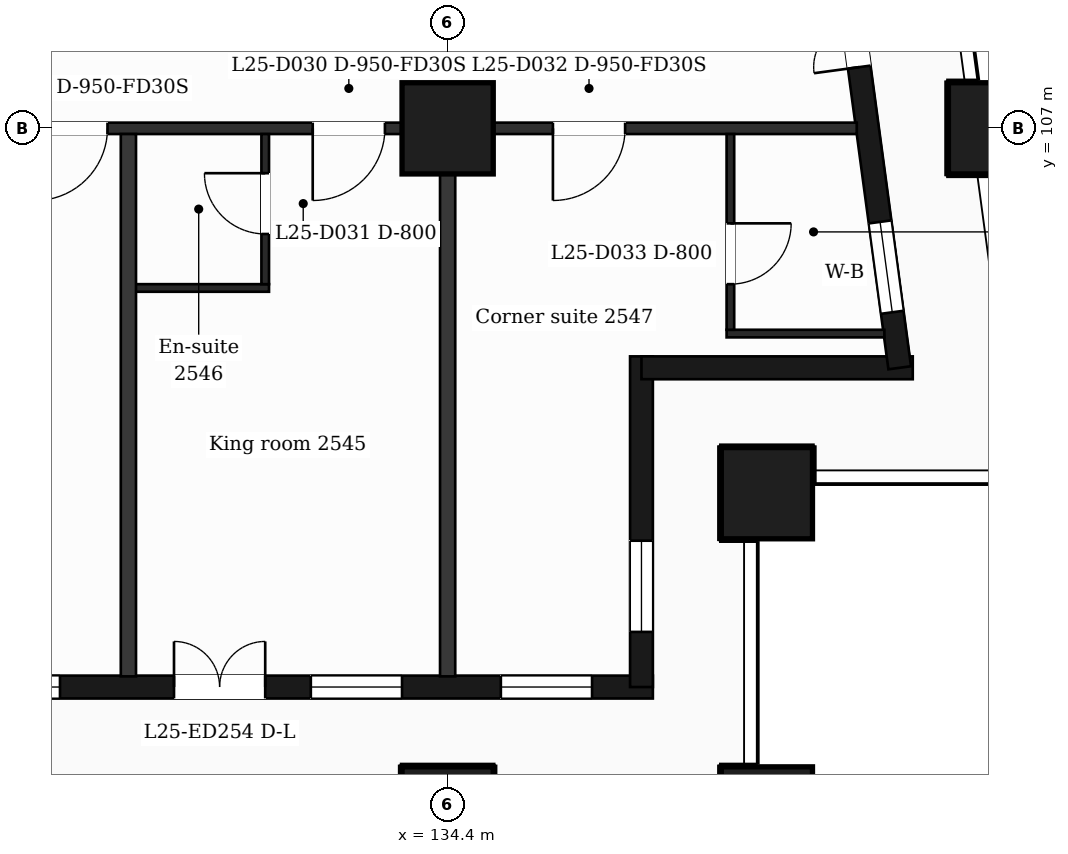
"""IFC4 building model, lengths in metres.
Left out: names, types, materials, properties, quantities, classifications, styles, units other than length and angle.
Written with IfcOpenShell. Run it as: python <this file> out.ifc"""

import sys

from ifc_helpers import new_model, si_unit, direction, frame, frame_2d, origin, origin_2d, place, context, subcontext, project, spatial, rectangle, extrude, element, fill, save


model = new_model("IFC4")
c1 = context("Model", 3, precision=1e-05, world=origin(), true_north=direction((0.0, 1.0)))
c2 = subcontext(c1, "Body", "Model", "MODEL_VIEW")
j1 = project(units=[si_unit("LENGTHUNIT", "METRE"), si_unit("PLANEANGLEUNIT", "RADIAN")], contexts=[c1])
p1 = place(None, origin())
s1 = spatial("IfcSite", under=j1, at=p1, CompositionType="ELEMENT")
p2 = place(p1, origin())
s2 = spatial("IfcBuilding", under=s1, at=p2, CompositionType="ELEMENT")
p3 = place(p2, frame((0.0, 0.0, 109.5)))
s3 = spatial("IfcBuildingStorey", under=s2, at=p3, CompositionType="ELEMENT", Elevation=109.5)
for number, where, z_axis, x_axis in (
    (1, (134.4, 98.0, 0.0), (0.0, 0.0, 1.0), (1.0, 0.0, 0.0)),
    (2, (138.6, 98.0, 0.0), (0.0, 0.0, 1.0), (1.0, 0.0, 0.0)),
    (3, (138.6, 102.2, 0.0), (0.0, 0.0, 1.0), (1.0, 0.0, 0.0)),
    (4, (134.4, 107.0, 0.0), (0.0, 0.0, 1.0), (1.0, 0.0, 0.0)),
    (5, (141.588, 107.0, 0.0), (0.0, 0.0, 1.0), (1.0, 0.0, 0.0)),
):
    element("IfcColumn", number, at=place(p3, frame(where, z_axis=z_axis, x_axis=x_axis)), inside=s3, PredefinedType="COLUMN", context=c2, shape_type="SweptSolid", body=[
        extrude(rectangle(XDim=1.2, YDim=1.2, at=origin_2d()), origin(), (0.0, 0.0, 1.0), 3.7),
    ])
p4 = place(p3, frame((89.85, 99.65, 0.0), z_axis=(0.0, 0.0, 1.0), x_axis=(1.0, 0.0, 0.0)))
e6 = element("IfcWall", 6, at=p4, inside=s3, PredefinedType="SOLIDWALL", context=c2, shape_type="SweptSolid", body=[
    extrude(rectangle(XDim=47.25, YDim=0.3, at=frame_2d((23.625, 0.0))), origin(), (0.0, 0.0, 1.0), 3.38),
])
p5 = place(p4, frame((0.725, 0.0, 0.9)))
e7 = element("IfcOpeningElement", 7, at=p5, cuts=e6, PredefinedType="OPENING", context=c2, shape_type="SweptSolid", body=[
    extrude(rectangle(XDim=1.2, YDim=2.1, at=frame_2d((0.6, 1.05))), frame((0.0, 0.16, 0.0), z_axis=(0.0, -1.0, 0.0), x_axis=(1.0, 0.0, 0.0)), (0.0, 0.0, 1.0), 0.32),
])
p6 = place(p4, frame((3.45, 0.0, 0.9)))
e8 = element("IfcOpeningElement", 8, at=p6, cuts=e6, PredefinedType="OPENING", context=c2, shape_type="SweptSolid", body=[
    extrude(rectangle(XDim=2.4, YDim=2.1, at=frame_2d((1.2, 1.05))), frame((0.0, 0.16, 0.0), z_axis=(0.0, -1.0, 0.0), x_axis=(1.0, 0.0, 0.0)), (0.0, 0.0, 1.0), 0.32),
])
p7 = place(p4, frame((7.65, 0.0, 0.9)))
e9 = element("IfcOpeningElement", 9, at=p7, cuts=e6, PredefinedType="OPENING", context=c2, shape_type="SweptSolid", body=[
    extrude(rectangle(XDim=2.4, YDim=2.1, at=frame_2d((1.2, 1.05))), frame((0.0, 0.16, 0.0), z_axis=(0.0, -1.0, 0.0), x_axis=(1.0, 0.0, 0.0)), (0.0, 0.0, 1.0), 0.32),
])
p8 = place(p4, frame((11.85, 0.0, 0.9)))
e10 = element("IfcOpeningElement", 10, at=p8, cuts=e6, PredefinedType="OPENING", context=c2, shape_type="SweptSolid", body=[
    extrude(rectangle(XDim=2.4, YDim=2.1, at=frame_2d((1.2, 1.05))), frame((0.0, 0.16, 0.0), z_axis=(0.0, -1.0, 0.0), x_axis=(1.0, 0.0, 0.0)), (0.0, 0.0, 1.0), 0.32),
])
p9 = place(p4, frame((16.05, 0.0, 0.9)))
e11 = element("IfcOpeningElement", 11, at=p9, cuts=e6, PredefinedType="OPENING", context=c2, shape_type="SweptSolid", body=[
    extrude(rectangle(XDim=2.4, YDim=2.1, at=frame_2d((1.2, 1.05))), frame((0.0, 0.16, 0.0), z_axis=(0.0, -1.0, 0.0), x_axis=(1.0, 0.0, 0.0)), (0.0, 0.0, 1.0), 0.32),
])
p10 = place(p4, frame((20.25, 0.0, 0.9)))
e12 = element("IfcOpeningElement", 12, at=p10, cuts=e6, PredefinedType="OPENING", context=c2, shape_type="SweptSolid", body=[
    extrude(rectangle(XDim=2.4, YDim=2.1, at=frame_2d((1.2, 1.05))), frame((0.0, 0.16, 0.0), z_axis=(0.0, -1.0, 0.0), x_axis=(1.0, 0.0, 0.0)), (0.0, 0.0, 1.0), 0.32),
])
p11 = place(p4, frame((25.05, 0.0, 0.9)))
e13 = element("IfcOpeningElement", 13, at=p11, cuts=e6, PredefinedType="OPENING", context=c2, shape_type="SweptSolid", body=[
    extrude(rectangle(XDim=1.2, YDim=2.1, at=frame_2d((0.6, 1.05))), frame((0.0, 0.16, 0.0), z_axis=(0.0, -1.0, 0.0), x_axis=(1.0, 0.0, 0.0)), (0.0, 0.0, 1.0), 0.32),
])
p12 = place(p4, frame((29.25, 0.0, 0.9)))
e14 = element("IfcOpeningElement", 14, at=p12, cuts=e6, PredefinedType="OPENING", context=c2, shape_type="SweptSolid", body=[
    extrude(rectangle(XDim=1.2, YDim=2.1, at=frame_2d((0.6, 1.05))), frame((0.0, 0.16, 0.0), z_axis=(0.0, -1.0, 0.0), x_axis=(1.0, 0.0, 0.0)), (0.0, 0.0, 1.0), 0.32),
])
p13 = place(p4, frame((32.55, 0.0, 0.0)))
e15 = element("IfcOpeningElement", 15, at=p13, cuts=e6, PredefinedType="OPENING", context=c2, shape_type="SweptSolid", body=[
    extrude(rectangle(XDim=1.2, YDim=2.4, at=frame_2d((0.6, 1.2))), frame((0.0, 0.16, 0.0), z_axis=(0.0, -1.0, 0.0), x_axis=(1.0, 0.0, 0.0)), (0.0, 0.0, 1.0), 0.32),
])
p14 = place(p4, frame((34.35, 0.0, 0.9)))
e16 = element("IfcOpeningElement", 16, at=p14, cuts=e6, PredefinedType="OPENING", context=c2, shape_type="SweptSolid", body=[
    extrude(rectangle(XDim=1.2, YDim=2.1, at=frame_2d((0.6, 1.05))), frame((0.0, 0.16, 0.0), z_axis=(0.0, -1.0, 0.0), x_axis=(1.0, 0.0, 0.0)), (0.0, 0.0, 1.0), 0.32),
])
p15 = place(p4, frame((37.05, 0.0, 0.9)))
e17 = element("IfcOpeningElement", 17, at=p15, cuts=e6, PredefinedType="OPENING", context=c2, shape_type="SweptSolid", body=[
    extrude(rectangle(XDim=2.4, YDim=2.1, at=frame_2d((1.2, 1.05))), frame((0.0, 0.16, 0.0), z_axis=(0.0, -1.0, 0.0), x_axis=(1.0, 0.0, 0.0)), (0.0, 0.0, 1.0), 0.32),
])
p16 = place(p4, frame((40.95, 0.0, 0.0)))
e18 = element("IfcOpeningElement", 18, at=p16, cuts=e6, PredefinedType="OPENING", context=c2, shape_type="SweptSolid", body=[
    extrude(rectangle(XDim=1.2, YDim=2.4, at=frame_2d((0.6, 1.2))), frame((0.0, 0.16, 0.0), z_axis=(0.0, -1.0, 0.0), x_axis=(1.0, 0.0, 0.0)), (0.0, 0.0, 1.0), 0.32),
])
p17 = place(p4, frame((42.75, 0.0, 0.9)))
e19 = element("IfcOpeningElement", 19, at=p17, cuts=e6, PredefinedType="OPENING", context=c2, shape_type="SweptSolid", body=[
    extrude(rectangle(XDim=1.2, YDim=2.1, at=frame_2d((0.6, 1.05))), frame((0.0, 0.16, 0.0), z_axis=(0.0, -1.0, 0.0), x_axis=(1.0, 0.0, 0.0)), (0.0, 0.0, 1.0), 0.32),
])
p18 = place(p4, frame((45.25, 0.0, 0.9)))
e20 = element("IfcOpeningElement", 20, at=p18, cuts=e6, PredefinedType="OPENING", context=c2, shape_type="SweptSolid", body=[
    extrude(rectangle(XDim=1.2, YDim=2.1, at=frame_2d((0.6, 1.05))), frame((0.0, 0.16, 0.0), z_axis=(0.0, -1.0, 0.0), x_axis=(1.0, 0.0, 0.0)), (0.0, 0.0, 1.0), 0.32),
])
p19 = place(p3, frame((136.95, 99.65, 0.0), z_axis=(0.0, 0.0, 1.0), x_axis=(0.0, 1.0, 0.0)))
e21 = element("IfcWall", 21, at=p19, inside=s3, PredefinedType="SOLIDWALL", context=c2, shape_type="SweptSolid", body=[
    extrude(rectangle(XDim=4.35, YDim=0.3, at=frame_2d((2.175, 0.0))), origin(), (0.0, 0.0, 1.0), 3.38),
])
p20 = place(p19, frame((0.725, 0.0, 0.9)))
e22 = element("IfcOpeningElement", 22, at=p20, cuts=e21, PredefinedType="OPENING", context=c2, shape_type="SweptSolid", body=[
    extrude(rectangle(XDim=1.2, YDim=2.1, at=frame_2d((0.6, 1.05))), frame((0.0, 0.16, 0.0), z_axis=(0.0, -1.0, 0.0), x_axis=(1.0, 0.0, 0.0)), (0.0, 0.0, 1.0), 0.32),
])
p21 = place(p3, frame((136.95, 103.85, 0.0), z_axis=(0.0, 0.0, 1.0), x_axis=(1.0, 0.0, 0.0)))
e23 = element("IfcWall", 23, at=p21, inside=s3, PredefinedType="SOLIDWALL", context=c2, shape_type="SweptSolid", body=[
    extrude(rectangle(XDim=3.569, YDim=0.3, at=frame_2d((1.785, 0.0))), origin(), (0.0, 0.0, 1.0), 3.38),
])
p22 = place(p3, frame((140.348, 103.85, 0.0), z_axis=(0.0, 0.0, 1.0), x_axis=(-0.133431549479, 0.991058031401, 0.0)))
e24 = element("IfcWall", 24, at=p22, inside=s3, PredefinedType="SOLIDWALL", context=c2, shape_type="SweptSolid", body=[
    extrude(rectangle(XDim=6.609, YDim=0.3, at=frame_2d((3.304, 0.0))), origin(), (0.0, 0.0, 1.0), 3.38),
])
p23 = place(p22, frame((0.737, 0.0, 0.9)))
e25 = element("IfcOpeningElement", 25, at=p23, cuts=e24, PredefinedType="OPENING", context=c2, shape_type="SweptSolid", body=[
    extrude(rectangle(XDim=1.2, YDim=2.1, at=frame_2d((0.6, 1.05))), frame((0.0, 0.16, 0.0), z_axis=(0.0, -1.0, 0.0), x_axis=(1.0, 0.0, 0.0)), (0.0, 0.0, 1.0), 0.32),
])
p24 = place(p22, frame((3.991, 0.0, 0.0)))
e26 = element("IfcOpeningElement", 26, at=p24, cuts=e24, PredefinedType="OPENING", context=c2, shape_type="SweptSolid", body=[
    extrude(rectangle(XDim=1.2, YDim=2.4, at=frame_2d((0.6, 1.2))), frame((0.0, 0.16, 0.0), z_axis=(0.0, -1.0, 0.0), x_axis=(1.0, 0.0, 0.0)), (0.0, 0.0, 1.0), 0.32),
])
p25 = place(p3, frame((138.07, 104.3, 0.0), z_axis=(0.0, 0.0, 1.0), x_axis=(1.0, 0.0, 0.0)))
e27 = element("IfcWall", 27, at=p25, inside=s3, PredefinedType="PARTITIONING", context=c2, shape_type="SweptSolid", body=[
    extrude(rectangle(XDim=2.076, YDim=0.1, at=frame_2d((1.038, 0.0))), origin(), (0.0, 0.0, 1.0), 3.38),
])
p26 = place(p3, frame((130.2, 104.9, 0.0), z_axis=(0.0, 0.0, 1.0), x_axis=(1.0, 0.0, 0.0)))
e28 = element("IfcWall", 28, at=p26, inside=s3, PredefinedType="PARTITIONING", context=c2, shape_type="SweptSolid", body=[
    extrude(rectangle(XDim=1.85, YDim=0.1, at=frame_2d((0.925, 0.0))), origin(), (0.0, 0.0, 1.0), 3.38),
])
p27 = place(p3, frame((87.018, 107.0, 0.0), z_axis=(0.0, 0.0, 1.0), x_axis=(1.0, 0.0, 0.0)))
e29 = element("IfcWall", 29, at=p27, inside=s3, PredefinedType="PARTITIONING", context=c2, shape_type="SweptSolid", body=[
    extrude(rectangle(XDim=52.765, YDim=0.15, at=frame_2d((26.382, 0.0))), origin(), (0.0, 0.0, 1.0), 3.38),
])
p28 = place(p27, frame((1.032, 0.0, 0.0)))
e30 = element("IfcOpeningElement", 30, at=p28, cuts=e29, PredefinedType="OPENING", context=c2, shape_type="SweptSolid", body=[
    extrude(rectangle(XDim=0.95, YDim=2.1, at=frame_2d((0.475, 1.05))), frame((0.0, 0.085, 0.0), z_axis=(0.0, -1.0, 0.0), x_axis=(1.0, 0.0, 0.0)), (0.0, 0.0, 1.0), 0.17),
])
p29 = place(p27, frame((9.752, 0.0, 0.0)))
e31 = element("IfcOpeningElement", 31, at=p29, cuts=e29, PredefinedType="OPENING", context=c2, shape_type="SweptSolid", body=[
    extrude(rectangle(XDim=1.0, YDim=2.1, at=frame_2d((0.5, 1.05))), frame((0.0, 0.085, 0.0), z_axis=(0.0, -1.0, 0.0), x_axis=(1.0, 0.0, 0.0)), (0.0, 0.0, 1.0), 0.17),
])
p30 = place(p27, frame((23.995, 0.0, 0.0)))
e32 = element("IfcOpeningElement", 32, at=p30, cuts=e29, PredefinedType="OPENING", context=c2, shape_type="SweptSolid", body=[
    extrude(rectangle(XDim=0.95, YDim=2.1, at=frame_2d((0.475, 1.05))), frame((0.0, 0.085, 0.0), z_axis=(0.0, -1.0, 0.0), x_axis=(1.0, 0.0, 0.0)), (0.0, 0.0, 1.0), 0.17),
])
p31 = place(p27, frame((28.645, 0.0, 0.0)))
e33 = element("IfcOpeningElement", 33, at=p31, cuts=e29, PredefinedType="OPENING", context=c2, shape_type="SweptSolid", body=[
    extrude(rectangle(XDim=0.95, YDim=2.1, at=frame_2d((0.475, 1.05))), frame((0.0, 0.085, 0.0), z_axis=(0.0, -1.0, 0.0), x_axis=(1.0, 0.0, 0.0)), (0.0, 0.0, 1.0), 0.17),
])
p32 = place(p27, frame((36.632, 0.0, 0.0)))
e34 = element("IfcOpeningElement", 34, at=p32, cuts=e29, PredefinedType="OPENING", context=c2, shape_type="SweptSolid", body=[
    extrude(rectangle(XDim=1.0, YDim=2.1, at=frame_2d((0.5, 1.05))), frame((0.0, 0.085, 0.0), z_axis=(0.0, -1.0, 0.0), x_axis=(1.0, 0.0, 0.0)), (0.0, 0.0, 1.0), 0.17),
])
p33 = place(p27, frame((41.957, 0.0, 0.0)))
e35 = element("IfcOpeningElement", 35, at=p33, cuts=e29, PredefinedType="OPENING", context=c2, shape_type="SweptSolid", body=[
    extrude(rectangle(XDim=0.95, YDim=2.1, at=frame_2d((0.475, 1.05))), frame((0.0, 0.085, 0.0), z_axis=(0.0, -1.0, 0.0), x_axis=(1.0, 0.0, 0.0)), (0.0, 0.0, 1.0), 0.17),
])
p34 = place(p27, frame((45.607, 0.0, 0.0)))
e36 = element("IfcOpeningElement", 36, at=p34, cuts=e29, PredefinedType="OPENING", context=c2, shape_type="SweptSolid", body=[
    extrude(rectangle(XDim=0.95, YDim=2.1, at=frame_2d((0.475, 1.05))), frame((0.0, 0.085, 0.0), z_axis=(0.0, -1.0, 0.0), x_axis=(1.0, 0.0, 0.0)), (0.0, 0.0, 1.0), 0.17),
])
p35 = place(p27, frame((48.767, 0.0, 0.0)))
e37 = element("IfcOpeningElement", 37, at=p35, cuts=e29, PredefinedType="OPENING", context=c2, shape_type="SweptSolid", body=[
    extrude(rectangle(XDim=0.95, YDim=2.1, at=frame_2d((0.475, 1.05))), frame((0.0, 0.085, 0.0), z_axis=(0.0, -1.0, 0.0), x_axis=(1.0, 0.0, 0.0)), (0.0, 0.0, 1.0), 0.17),
])
p36 = place(p3, frame((130.2, 99.79, 0.0), z_axis=(0.0, 0.0, 1.0), x_axis=(0.0, 1.0, 0.0)))
e38 = element("IfcWall", 38, at=p36, inside=s3, PredefinedType="PARTITIONING", context=c2, shape_type="SweptSolid", body=[
    extrude(rectangle(XDim=7.135, YDim=0.2, at=frame_2d((3.567, 0.0))), origin(), (0.0, 0.0, 1.0), 3.38),
])
p37 = place(p3, frame((132.0, 104.95, 0.0), z_axis=(0.0, 0.0, 1.0), x_axis=(0.0, 1.0, 0.0)))
e39 = element("IfcWall", 39, at=p37, inside=s3, PredefinedType="PARTITIONING", context=c2, shape_type="SweptSolid", body=[
    extrude(rectangle(XDim=1.975, YDim=0.1, at=frame_2d((0.988, 0.0))), origin(), (0.0, 0.0, 1.0), 3.38),
])
p38 = place(p37, frame((0.66, 0.0, 0.0)))
e40 = element("IfcOpeningElement", 40, at=p38, cuts=e39, PredefinedType="OPENING", context=c2, shape_type="SweptSolid", body=[
    extrude(rectangle(XDim=0.8, YDim=2.1, at=frame_2d((0.4, 1.05))), frame((0.0, 0.06, 0.0), z_axis=(0.0, -1.0, 0.0), x_axis=(1.0, 0.0, 0.0)), (0.0, 0.0, 1.0), 0.12),
])
p39 = place(p3, frame((134.4, 99.79, 0.0), z_axis=(0.0, 0.0, 1.0), x_axis=(0.0, 1.0, 0.0)))
e41 = element("IfcWall", 41, at=p39, inside=s3, PredefinedType="PARTITIONING", context=c2, shape_type="SweptSolid", body=[
    extrude(rectangle(XDim=7.135, YDim=0.2, at=frame_2d((3.567, 0.0))), origin(), (0.0, 0.0, 1.0), 3.38),
])
p40 = place(p3, frame((138.12, 104.35, 0.0), z_axis=(0.0, 0.0, 1.0), x_axis=(0.0, 1.0, 0.0)))
e42 = element("IfcWall", 42, at=p40, inside=s3, PredefinedType="PARTITIONING", context=c2, shape_type="SweptSolid", body=[
    extrude(rectangle(XDim=2.575, YDim=0.1, at=frame_2d((1.288, 0.0))), origin(), (0.0, 0.0, 1.0), 3.38),
])
p41 = place(p40, frame((0.6, 0.0, 0.0)))
e43 = element("IfcOpeningElement", 43, at=p41, cuts=e42, PredefinedType="OPENING", context=c2, shape_type="SweptSolid", body=[
    extrude(rectangle(XDim=0.8, YDim=2.1, at=frame_2d((0.4, 1.05))), frame((0.0, 0.06, 0.0), z_axis=(0.0, -1.0, 0.0), x_axis=(1.0, 0.0, 0.0)), (0.0, 0.0, 1.0), 0.12),
])
p42 = place(p15, origin())
e44 = element("IfcWindow", 44, at=p42, inside=s3, PartitioningType="SINGLE_PANEL", PredefinedType="WINDOW", context=c2, shape_type="SweptSolid", body=[
    extrude(rectangle(XDim=2.4, YDim=2.1, at=frame_2d((1.2, 1.05))), frame((0.0, 0.03, 0.0), z_axis=(0.0, -1.0, 0.0), x_axis=(1.0, 0.0, 0.0)), (0.0, 0.0, 1.0), 0.06),
])
fill(e17, e44)
p43 = place(p16, origin())
e45 = element("IfcDoor", 45, at=p43, inside=s3, OperationType="DOUBLE_DOOR_SINGLE_SWING", PredefinedType="DOOR", context=c2, shape_type="SweptSolid", body=[
    extrude(rectangle(XDim=1.2, YDim=2.4, at=frame_2d((0.6, 1.2))), frame((0.0, 0.025, 0.0), z_axis=(0.0, -1.0, 0.0), x_axis=(1.0, 0.0, 0.0)), (0.0, 0.0, 1.0), 0.05),
])
fill(e18, e45)
p44 = place(p17, origin())
e46 = element("IfcWindow", 46, at=p44, inside=s3, PartitioningType="SINGLE_PANEL", PredefinedType="WINDOW", context=c2, shape_type="SweptSolid", body=[
    extrude(rectangle(XDim=1.2, YDim=2.1, at=frame_2d((0.6, 1.05))), frame((0.0, 0.03, 0.0), z_axis=(0.0, -1.0, 0.0), x_axis=(1.0, 0.0, 0.0)), (0.0, 0.0, 1.0), 0.06),
])
fill(e19, e46)
p45 = place(p18, origin())
e47 = element("IfcWindow", 47, at=p45, inside=s3, PartitioningType="SINGLE_PANEL", PredefinedType="WINDOW", context=c2, shape_type="SweptSolid", body=[
    extrude(rectangle(XDim=1.2, YDim=2.1, at=frame_2d((0.6, 1.05))), frame((0.0, 0.03, 0.0), z_axis=(0.0, -1.0, 0.0), x_axis=(1.0, 0.0, 0.0)), (0.0, 0.0, 1.0), 0.06),
])
fill(e20, e47)
p46 = place(p20, origin())
e48 = element("IfcWindow", 48, at=p46, inside=s3, PartitioningType="SINGLE_PANEL", PredefinedType="WINDOW", context=c2, shape_type="SweptSolid", body=[
    extrude(rectangle(XDim=1.2, YDim=2.1, at=frame_2d((0.6, 1.05))), frame((0.0, 0.03, 0.0), z_axis=(0.0, -1.0, 0.0), x_axis=(1.0, 0.0, 0.0)), (0.0, 0.0, 1.0), 0.06),
])
fill(e22, e48)
p47 = place(p23, origin())
e49 = element("IfcWindow", 49, at=p47, inside=s3, PartitioningType="SINGLE_PANEL", PredefinedType="WINDOW", context=c2, shape_type="SweptSolid", body=[
    extrude(rectangle(XDim=1.2, YDim=2.1, at=frame_2d((0.6, 1.05))), frame((0.0, 0.03, 0.0), z_axis=(0.0, -1.0, 0.0), x_axis=(1.0, 0.0, 0.0)), (0.0, 0.0, 1.0), 0.06),
])
fill(e25, e49)
p48 = place(p24, origin())
e50 = element("IfcDoor", 50, at=p48, inside=s3, OperationType="DOUBLE_DOOR_SINGLE_SWING", PredefinedType="DOOR", context=c2, shape_type="SweptSolid", body=[
    extrude(rectangle(XDim=1.2, YDim=2.4, at=frame_2d((0.6, 1.2))), frame((0.0, 0.025, 0.0), z_axis=(0.0, -1.0, 0.0), x_axis=(1.0, 0.0, 0.0)), (0.0, 0.0, 1.0), 0.05),
])
fill(e26, e50)
p49 = place(p33, origin())
e51 = element("IfcDoor", 51, at=p49, inside=s3, OperationType="SINGLE_SWING_LEFT", PredefinedType="DOOR", context=c2, shape_type="SweptSolid", body=[
    extrude(rectangle(XDim=0.95, YDim=2.1, at=frame_2d((0.475, 1.05))), frame((0.0, 0.025, 0.0), z_axis=(0.0, -1.0, 0.0), x_axis=(1.0, 0.0, 0.0)), (0.0, 0.0, 1.0), 0.05),
])
fill(e35, e51)
p50 = place(p34, origin())
e52 = element("IfcDoor", 52, at=p50, inside=s3, OperationType="SINGLE_SWING_LEFT", PredefinedType="DOOR", context=c2, shape_type="SweptSolid", body=[
    extrude(rectangle(XDim=0.95, YDim=2.1, at=frame_2d((0.475, 1.05))), frame((0.0, 0.025, 0.0), z_axis=(0.0, -1.0, 0.0), x_axis=(1.0, 0.0, 0.0)), (0.0, 0.0, 1.0), 0.05),
])
fill(e36, e52)
p51 = place(p38, origin())
e53 = element("IfcDoor", 53, at=p51, inside=s3, OperationType="SINGLE_SWING_RIGHT", PredefinedType="DOOR", context=c2, shape_type="SweptSolid", body=[
    extrude(rectangle(XDim=0.8, YDim=2.1, at=frame_2d((0.4, 1.05))), frame((0.0, 0.025, 0.0), z_axis=(0.0, -1.0, 0.0), x_axis=(1.0, 0.0, 0.0)), (0.0, 0.0, 1.0), 0.05),
])
fill(e40, e53)
p52 = place(p35, origin())
e54 = element("IfcDoor", 54, at=p52, inside=s3, OperationType="SINGLE_SWING_LEFT", PredefinedType="DOOR", context=c2, shape_type="SweptSolid", body=[
    extrude(rectangle(XDim=0.95, YDim=2.1, at=frame_2d((0.475, 1.05))), frame((0.0, 0.025, 0.0), z_axis=(0.0, -1.0, 0.0), x_axis=(1.0, 0.0, 0.0)), (0.0, 0.0, 1.0), 0.05),
])
fill(e37, e54)
p53 = place(p41, origin())
e55 = element("IfcDoor", 55, at=p53, inside=s3, OperationType="SINGLE_SWING_RIGHT", PredefinedType="DOOR", context=c2, shape_type="SweptSolid", body=[
    extrude(rectangle(XDim=0.8, YDim=2.1, at=frame_2d((0.4, 1.05))), frame((0.0, 0.025, 0.0), z_axis=(0.0, -1.0, 0.0), x_axis=(1.0, 0.0, 0.0)), (0.0, 0.0, 1.0), 0.05),
])
fill(e43, e55)
save(model, sys.argv[1])
